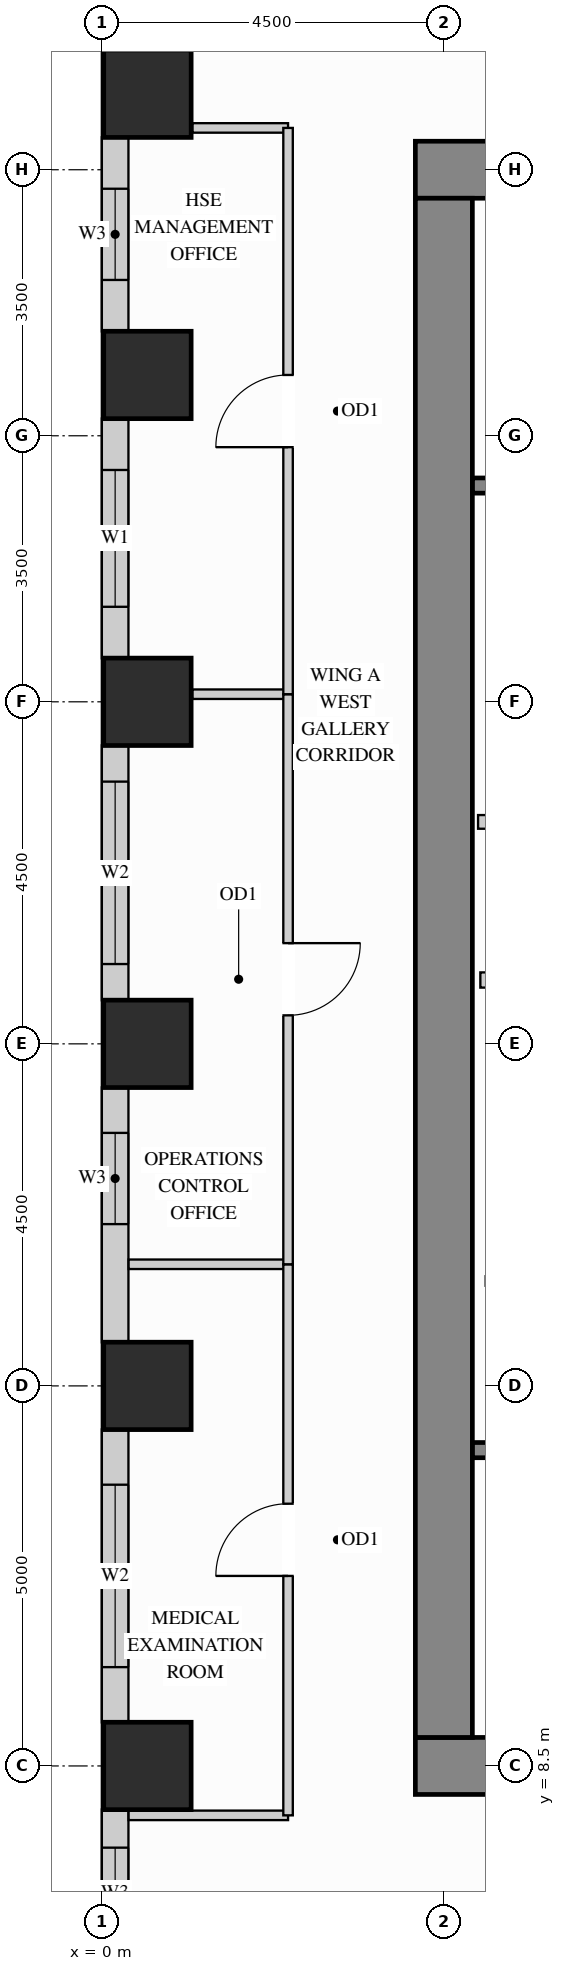
"""IFC4 building model, lengths in metres.
Left out: names, types, materials, properties, quantities, classifications, styles, units other than length and angle.
Written with IfcOpenShell. Run it as: python <this file> out.ifc"""

import sys

from ifc_helpers import new_model, si_unit, direction, frame, frame_2d, origin, origin_2d, place, context, subcontext, project, spatial, rectangle, extrude, source, transform, mapped, element, fill, save


model = new_model("IFC4")
c1 = context("Model", 3, precision=1e-05, world=origin(), true_north=direction((0.0, 1.0)))
c2 = subcontext(c1, "Body", "Model", "MODEL_VIEW")
j1 = project(units=[si_unit("LENGTHUNIT", "METRE"), si_unit("PLANEANGLEUNIT", "RADIAN")], contexts=[c1])
p1 = place(None, origin())
s1 = spatial("IfcSite", under=j1, at=p1, CompositionType="ELEMENT")
p2 = place(p1, origin())
s2 = spatial("IfcBuilding", under=s1, at=p2, CompositionType="ELEMENT")
p3 = place(p2, frame((0.0, 0.0, 91.8)))
s3 = spatial("IfcBuildingStorey", under=s2, at=p3, CompositionType="ELEMENT", Elevation=91.8)
m1 = source(origin(), c2, "Body", "SweptSolid", [
    extrude(rectangle(XDim=1.15, YDim=1.15, at=origin_2d()), origin(), (0.0, 0.0, 1.0), 3.38),
])
for number, where, z_axis, x_axis in (
    (1, (0.6, 13.5, 0.0), (0.0, 0.0, 1.0), (1.0, 0.0, 0.0)),
    (2, (0.6, 18.0, 0.0), (0.0, 0.0, 1.0), (1.0, 0.0, 0.0)),
    (3, (0.6, 22.5, 0.0), (0.0, 0.0, 1.0), (1.0, 0.0, 0.0)),
    (4, (0.6, 26.8, 0.0), (0.0, 0.0, 1.0), (1.0, 0.0, 0.0)),
    (5, (0.6, 30.5, 0.0), (0.0, 0.0, 1.0), (1.0, 0.0, 0.0)),
    (6, (0.6, 8.5, 0.0), (0.0, 0.0, 1.0), (1.0, 0.0, 0.0)),
):
    element("IfcColumn", number, at=place(p3, frame(where, z_axis=z_axis, x_axis=x_axis)), inside=s3, PredefinedType="COLUMN", context=c2, shape_type="MappedRepresentation", body=[
        mapped(m1, transform((0.0, 0.0, 0.0), x_axis=(1.0, 0.0, 0.0), y_axis=(0.0, 1.0, 0.0), z_axis=(0.0, 0.0, 1.0))),
    ])
m2 = source(origin(), c2, "Body", "SweptSolid", [
    extrude(rectangle(XDim=10.75, YDim=0.75, at=frame_2d((5.375, 0.0))), origin(), (0.0, 0.0, 1.0), 3.38),
])
for number, where, z_axis, x_axis in (
    (7, (4.125, 29.5, 0.0), (0.0, 0.0, 1.0), (1.0, 0.0, 0.0)),
    (8, (4.125, 8.5, 0.0), (0.0, 0.0, 1.0), (1.0, 0.0, 0.0)),
):
    element("IfcWall", number, at=place(p3, frame(where, z_axis=z_axis, x_axis=x_axis)), inside=s3, PredefinedType="SHEAR", context=c2, shape_type="MappedRepresentation", body=[
        mapped(m2, transform((0.0, 0.0, 0.0), x_axis=(1.0, 0.0, 0.0), y_axis=(0.0, 1.0, 0.0), z_axis=(0.0, 0.0, 1.0))),
    ])
m3 = source(origin(), c2, "Body", "SweptSolid", [
    extrude(rectangle(XDim=20.25, YDim=0.75, at=frame_2d((10.125, 0.0))), origin(), (0.0, 0.0, 1.0), 3.38),
])
p4 = place(p3, frame((4.5, 8.875, 0.0), z_axis=(0.0, 0.0, 1.0), x_axis=(0.0, 1.0, 0.0)))
e9 = element("IfcWall", 9, at=p4, inside=s3, PredefinedType="SHEAR", context=c2, shape_type="MappedRepresentation", body=[
    mapped(m3, transform((0.0, 0.0, 0.0), x_axis=(1.0, 0.0, 0.0), y_axis=(0.0, 1.0, 0.0), z_axis=(0.0, 0.0, 1.0))),
])
p5 = place(p3, frame((0.175, 29.927, 0.0), z_axis=(0.0, 0.0, 1.0), x_axis=(0.0, -1.0, 0.0)))
e10 = element("IfcWall", 10, at=p5, inside=s3, PredefinedType="SOLIDWALL", context=c2, shape_type="SweptSolid", body=[
    extrude(rectangle(XDim=2.554, YDim=0.35, at=frame_2d((1.277, 0.0))), origin(), (0.0, 0.0, 1.0), 3.365),
])
p6 = place(p5, frame((0.677, 0.0, 0.78)))
e11 = element("IfcOpeningElement", 11, at=p6, cuts=e10, PredefinedType="OPENING", context=c2, shape_type="SweptSolid", body=[
    extrude(rectangle(XDim=1.2, YDim=2.1, at=frame_2d((0.6, 1.05))), frame((0.0, 0.185, 0.0), z_axis=(0.0, -1.0, 0.0), x_axis=(1.0, 0.0, 0.0)), (0.0, 0.0, 1.0), 0.37),
])
p7 = place(p3, frame((0.175, 26.227, 0.0), z_axis=(0.0, 0.0, 1.0), x_axis=(0.0, -1.0, 0.0)))
e12 = element("IfcWall", 12, at=p7, inside=s3, PredefinedType="SOLIDWALL", context=c2, shape_type="SweptSolid", body=[
    extrude(rectangle(XDim=3.154, YDim=0.35, at=frame_2d((1.577, 0.0))), origin(), (0.0, 0.0, 1.0), 3.365),
])
p8 = place(p7, frame((0.677, 0.0, 0.78)))
e13 = element("IfcOpeningElement", 13, at=p8, cuts=e12, PredefinedType="OPENING", context=c2, shape_type="SweptSolid", body=[
    extrude(rectangle(XDim=1.8, YDim=2.1, at=frame_2d((0.9, 1.05))), frame((0.0, 0.185, 0.0), z_axis=(0.0, -1.0, 0.0), x_axis=(1.0, 0.0, 0.0)), (0.0, 0.0, 1.0), 0.37),
])
p9 = place(p3, frame((0.175, 21.927, 0.0), z_axis=(0.0, 0.0, 1.0), x_axis=(0.0, -1.0, 0.0)))
e14 = element("IfcWall", 14, at=p9, inside=s3, PredefinedType="SOLIDWALL", context=c2, shape_type="SweptSolid", body=[
    extrude(rectangle(XDim=3.354, YDim=0.35, at=frame_2d((1.677, 0.0))), origin(), (0.0, 0.0, 1.0), 3.365),
])
p10 = place(p9, frame((0.477, 0.0, 0.78)))
e15 = element("IfcOpeningElement", 15, at=p10, cuts=e14, PredefinedType="OPENING", context=c2, shape_type="SweptSolid", body=[
    extrude(rectangle(XDim=2.4, YDim=2.1, at=frame_2d((1.2, 1.05))), frame((0.0, 0.185, 0.0), z_axis=(0.0, -1.0, 0.0), x_axis=(1.0, 0.0, 0.0)), (0.0, 0.0, 1.0), 0.37),
])
p11 = place(p3, frame((0.175, 17.427, 0.0), z_axis=(0.0, 0.0, 1.0), x_axis=(0.0, -1.0, 0.0)))
e16 = element("IfcWall", 16, at=p11, inside=s3, PredefinedType="SOLIDWALL", context=c2, shape_type="SweptSolid", body=[
    extrude(rectangle(XDim=3.354, YDim=0.35, at=frame_2d((1.677, 0.0))), origin(), (0.0, 0.0, 1.0), 3.365),
])
p12 = place(p11, frame((0.598, 0.0, 0.78)))
e17 = element("IfcOpeningElement", 17, at=p12, cuts=e16, PredefinedType="OPENING", context=c2, shape_type="SweptSolid", body=[
    extrude(rectangle(XDim=1.2, YDim=2.1, at=frame_2d((0.6, 1.05))), frame((0.0, 0.185, 0.0), z_axis=(0.0, -1.0, 0.0), x_axis=(1.0, 0.0, 0.0)), (0.0, 0.0, 1.0), 0.37),
])
p13 = place(p3, frame((0.175, 12.927, 0.0), z_axis=(0.0, 0.0, 1.0), x_axis=(0.0, -1.0, 0.0)))
e18 = element("IfcWall", 18, at=p13, inside=s3, PredefinedType="SOLIDWALL", context=c2, shape_type="SweptSolid", body=[
    extrude(rectangle(XDim=3.854, YDim=0.35, at=frame_2d((1.927, 0.0))), origin(), (0.0, 0.0, 1.0), 3.365),
])
p14 = place(p13, frame((0.727, 0.0, 0.78)))
e19 = element("IfcOpeningElement", 19, at=p14, cuts=e18, PredefinedType="OPENING", context=c2, shape_type="SweptSolid", body=[
    extrude(rectangle(XDim=2.4, YDim=2.1, at=frame_2d((1.2, 1.05))), frame((0.0, 0.185, 0.0), z_axis=(0.0, -1.0, 0.0), x_axis=(1.0, 0.0, 0.0)), (0.0, 0.0, 1.0), 0.37),
])
p15 = place(p3, frame((0.175, 7.927, 0.0), z_axis=(0.0, 0.0, 1.0), x_axis=(0.0, -1.0, 0.0)))
e20 = element("IfcWall", 20, at=p15, inside=s3, PredefinedType="SOLIDWALL", context=c2, shape_type="SweptSolid", body=[
    extrude(rectangle(XDim=3.854, YDim=0.35, at=frame_2d((1.927, 0.0))), origin(), (0.0, 0.0, 1.0), 3.365),
])
p16 = place(p15, frame((0.502, 0.0, 0.78)))
e21 = element("IfcOpeningElement", 21, at=p16, cuts=e20, PredefinedType="OPENING", context=c2, shape_type="SweptSolid", body=[
    extrude(rectangle(XDim=1.2, YDim=2.1, at=frame_2d((0.6, 1.05))), frame((0.0, 0.185, 0.0), z_axis=(0.0, -1.0, 0.0), x_axis=(1.0, 0.0, 0.0)), (0.0, 0.0, 1.0), 0.37),
])
m4 = source(origin(), c2, "Body", "SweptSolid", [
    extrude(rectangle(XDim=2.2, YDim=0.18, at=frame_2d((1.1, 0.0))), origin(), (0.0, 0.0, 1.0), 3.365),
])
p17 = place(p3, frame((4.95, 20.92, 0.0), z_axis=(0.0, 0.0, 1.0), x_axis=(1.0, 0.0, 0.0)))
e22 = element("IfcWall", 22, at=p17, inside=s3, PredefinedType="PARTITIONING", context=c2, shape_type="MappedRepresentation", body=[
    mapped(m4, transform((0.0, 0.0, 0.0), x_axis=(1.0, 0.0, 0.0), y_axis=(0.0, 1.0, 0.0), z_axis=(0.0, 0.0, 1.0))),
])
p18 = place(p3, frame((5.05, 14.88, 0.0), z_axis=(0.0, 0.0, 1.0), x_axis=(1.0, 0.0, 0.0)))
e23 = element("IfcWall", 23, at=p18, inside=s3, PredefinedType="PARTITIONING", context=c2, shape_type="SweptSolid", body=[
    extrude(rectangle(XDim=2.35, YDim=0.125, at=frame_2d((1.175, 0.0))), origin(), (0.0, 0.0, 1.0), 3.365),
])
p19 = place(p18, frame((0.7, 0.0, 0.0)))
e24 = element("IfcOpeningElement", 24, at=p19, cuts=e23, PredefinedType="OPENING", context=c2, shape_type="SweptSolid", body=[
    extrude(rectangle(XDim=0.85, YDim=2.1, at=frame_2d((0.425, 1.05))), frame((0.0, 0.073, 0.0), z_axis=(0.0, -1.0, 0.0), x_axis=(1.0, 0.0, 0.0)), (0.0, 0.0, 1.0), 0.145),
])
m5 = source(origin(), c2, "Body", "SweptSolid", [
    extrude(rectangle(XDim=1.26, YDim=0.125, at=frame_2d((0.63, 0.0))), origin(), (0.0, 0.0, 1.0), 3.365),
])
p20 = place(p3, frame((1.19, 30.05, 0.0), z_axis=(0.0, 0.0, 1.0), x_axis=(1.0, 0.0, 0.0)))
e25 = element("IfcWall", 25, at=p20, inside=s3, PredefinedType="PARTITIONING", context=c2, shape_type="MappedRepresentation", body=[
    mapped(m5, transform((0.0, 0.0, 0.0), x_axis=(1.0, 0.0, 0.0), y_axis=(0.0, 1.0, 0.0), z_axis=(0.0, 0.0, 1.0))),
])
m6 = source(origin(), c2, "Body", "SweptSolid", [
    extrude(rectangle(XDim=2.098, YDim=0.125, at=frame_2d((1.049, 0.0))), origin(), (0.0, 0.0, 1.0), 3.365),
])
for number, where, z_axis, x_axis in (
    (26, (0.352, 7.85, 0.0), (0.0, 0.0, 1.0), (1.0, 0.0, 0.0)),
    (27, (0.352, 15.1, 0.0), (0.0, 0.0, 1.0), (1.0, 0.0, 0.0)),
):
    element("IfcWall", number, at=place(p3, frame(where, z_axis=z_axis, x_axis=x_axis)), inside=s3, PredefinedType="PARTITIONING", context=c2, shape_type="MappedRepresentation", body=[
        mapped(m6, transform((0.0, 0.0, 0.0), x_axis=(1.0, 0.0, 0.0), y_axis=(0.0, 1.0, 0.0), z_axis=(0.0, 0.0, 1.0))),
    ])
p21 = place(p3, frame((1.19, 22.6, 0.0), z_axis=(0.0, 0.0, 1.0), x_axis=(1.0, 0.0, 0.0)))
e28 = element("IfcWall", 28, at=p21, inside=s3, PredefinedType="PARTITIONING", context=c2, shape_type="MappedRepresentation", body=[
    mapped(m5, transform((0.0, 0.0, 0.0), x_axis=(1.0, 0.0, 0.0), y_axis=(0.0, 1.0, 0.0), z_axis=(0.0, 0.0, 1.0))),
])
p22 = place(p3, frame((2.45, 7.85, 0.0), z_axis=(0.0, 0.0, 1.0), x_axis=(0.0, 1.0, 0.0)))
e29 = element("IfcWall", 29, at=p22, inside=s3, PredefinedType="PARTITIONING", context=c2, shape_type="SweptSolid", body=[
    extrude(rectangle(XDim=7.25, YDim=0.125, at=frame_2d((3.625, 0.0))), origin(), (0.0, 0.0, 1.0), 3.365),
])
p23 = place(p22, frame((3.15, 0.0, 0.0)))
e30 = element("IfcOpeningElement", 30, at=p23, cuts=e29, PredefinedType="OPENING", context=c2, shape_type="SweptSolid", body=[
    extrude(rectangle(XDim=0.95, YDim=2.15, at=frame_2d((0.475, 1.075))), frame((0.0, 0.073, 0.0), z_axis=(0.0, -1.0, 0.0), x_axis=(1.0, 0.0, 0.0)), (0.0, 0.0, 1.0), 0.145),
])
p24 = place(p3, frame((2.45, 15.1, 0.0), z_axis=(0.0, 0.0, 1.0), x_axis=(0.0, 1.0, 0.0)))
e31 = element("IfcWall", 31, at=p24, inside=s3, PredefinedType="PARTITIONING", context=c2, shape_type="SweptSolid", body=[
    extrude(rectangle(XDim=7.5, YDim=0.125, at=frame_2d((3.75, 0.0))), origin(), (0.0, 0.0, 1.0), 3.365),
])
p25 = place(p24, frame((3.275, 0.0, 0.0)))
e32 = element("IfcOpeningElement", 32, at=p25, cuts=e31, PredefinedType="OPENING", context=c2, shape_type="SweptSolid", body=[
    extrude(rectangle(XDim=0.95, YDim=2.15, at=frame_2d((0.475, 1.075))), frame((0.0, 0.073, 0.0), z_axis=(0.0, -1.0, 0.0), x_axis=(1.0, 0.0, 0.0)), (0.0, 0.0, 1.0), 0.145),
])
p26 = place(p3, frame((2.45, 22.6, 0.0), z_axis=(0.0, 0.0, 1.0), x_axis=(0.0, 1.0, 0.0)))
e33 = element("IfcWall", 33, at=p26, inside=s3, PredefinedType="PARTITIONING", context=c2, shape_type="SweptSolid", body=[
    extrude(rectangle(XDim=7.45, YDim=0.125, at=frame_2d((3.725, 0.0))), origin(), (0.0, 0.0, 1.0), 3.365),
])
p27 = place(p26, frame((3.25, 0.0, 0.0)))
e34 = element("IfcOpeningElement", 34, at=p27, cuts=e33, PredefinedType="OPENING", context=c2, shape_type="SweptSolid", body=[
    extrude(rectangle(XDim=0.95, YDim=2.15, at=frame_2d((0.475, 1.075))), frame((0.0, 0.073, 0.0), z_axis=(0.0, -1.0, 0.0), x_axis=(1.0, 0.0, 0.0)), (0.0, 0.0, 1.0), 0.145),
])
m7 = source(origin(), c2, "Body", "SweptSolid", [
    extrude(rectangle(XDim=2.09, YDim=0.2, at=frame_2d((1.045, 0.0))), origin(), (0.0, 0.0, 1.0), 3.365),
])
p28 = place(p3, frame((4.98, 18.84, 0.0), z_axis=(0.0, 0.0, 1.0), x_axis=(1.0, 0.0, 0.0)))
e35 = element("IfcWall", 35, at=p28, inside=s3, PredefinedType="PARTITIONING", context=c2, shape_type="MappedRepresentation", body=[
    mapped(m7, transform((0.0, 0.0, 0.0), x_axis=(1.0, 0.0, 0.0), y_axis=(0.0, 1.0, 0.0), z_axis=(0.0, 0.0, 1.0))),
])
p29 = place(p3, frame((4.877, 12.655, 0.0), z_axis=(0.0, 0.0, 1.0), x_axis=(1.0, 0.0, 0.0)))
e36 = element("IfcWall", 36, at=p29, inside=s3, PredefinedType="SHEAR", context=c2, shape_type="SweptSolid", body=[
    extrude(rectangle(XDim=7.528, YDim=0.2, at=frame_2d((3.764, 0.0))), origin(), (0.0, 0.0, 1.0), 3.38),
])
p30 = place(p29, frame((0.4, 0.0, 0.0)))
e37 = element("IfcOpeningElement", 37, at=p30, cuts=e36, PredefinedType="OPENING", context=c2, shape_type="SweptSolid", body=[
    extrude(rectangle(XDim=1.1, YDim=2.15, at=frame_2d((0.55, 1.075))), frame((0.0, 0.11, 0.0), z_axis=(0.0, -1.0, 0.0), x_axis=(1.0, 0.0, 0.0)), (0.0, 0.0, 1.0), 0.22),
])
p31 = place(p3, frame((4.877, 25.345, 0.0), z_axis=(0.0, 0.0, 1.0), x_axis=(1.0, 0.0, 0.0)))
e38 = element("IfcWall", 38, at=p31, inside=s3, PredefinedType="SHEAR", context=c2, shape_type="SweptSolid", body=[
    extrude(rectangle(XDim=7.528, YDim=0.2, at=frame_2d((3.764, 0.0))), origin(), (0.0, 0.0, 1.0), 3.38),
])
p32 = place(p31, frame((0.4, 0.0, 0.0)))
e39 = element("IfcOpeningElement", 39, at=p32, cuts=e38, PredefinedType="OPENING", context=c2, shape_type="SweptSolid", body=[
    extrude(rectangle(XDim=1.1, YDim=2.15, at=frame_2d((0.55, 1.075))), frame((0.0, 0.11, 0.0), z_axis=(0.0, -1.0, 0.0), x_axis=(1.0, 0.0, 0.0)), (0.0, 0.0, 1.0), 0.22),
])
m8 = source(origin(), c2, "Body", "SweptSolid", [
    extrude(rectangle(XDim=0.95, YDim=2.15, at=frame_2d((0.475, 1.075))), frame((0.0, 0.025, 0.0), z_axis=(0.0, -1.0, 0.0), x_axis=(1.0, 0.0, 0.0)), (0.0, 0.0, 1.0), 0.05),
])
p33 = place(p23, origin())
e40 = element("IfcDoor", 40, at=p33, inside=s3, OperationType="SINGLE_SWING_LEFT", PredefinedType="DOOR", context=c2, shape_type="MappedRepresentation", body=[
    mapped(m8, transform((0.0, 0.0, 0.0), x_axis=(1.0, 0.0, 0.0), y_axis=(0.0, 1.0, 0.0), z_axis=(0.0, 0.0, 1.0))),
])
fill(e30, e40)
p34 = place(p25, origin())
e41 = element("IfcDoor", 41, at=p34, inside=s3, OperationType="SINGLE_SWING_RIGHT", PredefinedType="DOOR", context=c2, shape_type="MappedRepresentation", body=[
    mapped(m8, transform((0.0, 0.0, 0.0), x_axis=(1.0, 0.0, 0.0), y_axis=(0.0, 1.0, 0.0), z_axis=(0.0, 0.0, 1.0))),
])
fill(e32, e41)
p35 = place(p27, origin())
e42 = element("IfcDoor", 42, at=p35, inside=s3, OperationType="SINGLE_SWING_LEFT", PredefinedType="DOOR", context=c2, shape_type="MappedRepresentation", body=[
    mapped(m8, transform((0.0, 0.0, 0.0), x_axis=(1.0, 0.0, 0.0), y_axis=(0.0, 1.0, 0.0), z_axis=(0.0, 0.0, 1.0))),
])
fill(e34, e42)
m9 = source(origin(), c2, "Body", "SweptSolid", [
    extrude(rectangle(XDim=1.8, YDim=2.1, at=frame_2d((0.9, 1.05))), frame((0.0, 0.03, 0.0), z_axis=(0.0, -1.0, 0.0), x_axis=(1.0, 0.0, 0.0)), (0.0, 0.0, 1.0), 0.06),
])
p36 = place(p8, origin())
e43 = element("IfcWindow", 43, at=p36, inside=s3, PartitioningType="SINGLE_PANEL", PredefinedType="WINDOW", context=c2, shape_type="MappedRepresentation", body=[
    mapped(m9, transform((0.0, 0.0, 0.0), x_axis=(1.0, 0.0, 0.0), y_axis=(0.0, 1.0, 0.0), z_axis=(0.0, 0.0, 1.0))),
])
fill(e13, e43)
m10 = source(origin(), c2, "Body", "SweptSolid", [
    extrude(rectangle(XDim=2.4, YDim=2.1, at=frame_2d((1.2, 1.05))), frame((0.0, 0.03, 0.0), z_axis=(0.0, -1.0, 0.0), x_axis=(1.0, 0.0, 0.0)), (0.0, 0.0, 1.0), 0.06),
])
p37 = place(p10, origin())
e44 = element("IfcWindow", 44, at=p37, inside=s3, PartitioningType="SINGLE_PANEL", PredefinedType="WINDOW", context=c2, shape_type="MappedRepresentation", body=[
    mapped(m10, transform((0.0, 0.0, 0.0), x_axis=(1.0, 0.0, 0.0), y_axis=(0.0, 1.0, 0.0), z_axis=(0.0, 0.0, 1.0))),
])
fill(e15, e44)
p38 = place(p14, origin())
e45 = element("IfcWindow", 45, at=p38, inside=s3, PartitioningType="SINGLE_PANEL", PredefinedType="WINDOW", context=c2, shape_type="MappedRepresentation", body=[
    mapped(m10, transform((0.0, 0.0, 0.0), x_axis=(1.0, 0.0, 0.0), y_axis=(0.0, 1.0, 0.0), z_axis=(0.0, 0.0, 1.0))),
])
fill(e19, e45)
m11 = source(origin(), c2, "Body", "SweptSolid", [
    extrude(rectangle(XDim=1.2, YDim=2.1, at=frame_2d((0.6, 1.05))), frame((0.0, 0.03, 0.0), z_axis=(0.0, -1.0, 0.0), x_axis=(1.0, 0.0, 0.0)), (0.0, 0.0, 1.0), 0.06),
])
p39 = place(p6, origin())
e46 = element("IfcWindow", 46, at=p39, inside=s3, PartitioningType="SINGLE_PANEL", PredefinedType="WINDOW", context=c2, shape_type="MappedRepresentation", body=[
    mapped(m11, transform((0.0, 0.0, 0.0), x_axis=(1.0, 0.0, 0.0), y_axis=(0.0, 1.0, 0.0), z_axis=(0.0, 0.0, 1.0))),
])
fill(e11, e46)
p40 = place(p12, origin())
e47 = element("IfcWindow", 47, at=p40, inside=s3, PartitioningType="SINGLE_PANEL", PredefinedType="WINDOW", context=c2, shape_type="MappedRepresentation", body=[
    mapped(m11, transform((0.0, 0.0, 0.0), x_axis=(1.0, 0.0, 0.0), y_axis=(0.0, 1.0, 0.0), z_axis=(0.0, 0.0, 1.0))),
])
fill(e17, e47)
p41 = place(p16, origin())
e48 = element("IfcWindow", 48, at=p41, inside=s3, PartitioningType="SINGLE_PANEL", PredefinedType="WINDOW", context=c2, shape_type="MappedRepresentation", body=[
    mapped(m11, transform((0.0, 0.0, 0.0), x_axis=(1.0, 0.0, 0.0), y_axis=(0.0, 1.0, 0.0), z_axis=(0.0, 0.0, 1.0))),
])
fill(e21, e48)
save(model, sys.argv[1])
